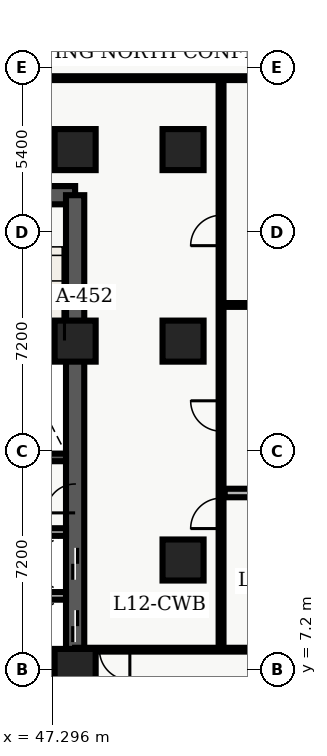
"""IFC4 building model, lengths in metres.
Left out: names, types, materials, properties, quantities, classifications, styles, units other than length and angle.
Written with IfcOpenShell. Run it as: python <this file> out.ifc"""

import sys

from ifc_helpers import new_model, entity, si_unit, converted_unit, direction, frame, origin_with_axes, origin_2d_with_axis, place, context, subcontext, project, spatial, polyline, rectangle, outline, extrude, element, fill, save


model = new_model("IFC4")
c1 = context("Model", 3, precision=1e-05, world=origin_with_axes(), true_north=direction((0.0, 1.0)))
c2 = subcontext(c1, "Body", "Model", "MODEL_VIEW")
j1 = project(units=[si_unit("LENGTHUNIT", "METRE"), converted_unit("PLANEANGLEUNIT", "DEGREE", entity("IfcPlaneAngleMeasure", 0.017), si_unit("PLANEANGLEUNIT", "RADIAN"), dimensions=[0, 0, 0, 0, 0, 0, 0])], contexts=[c1])
p1 = place(None, origin_with_axes())
s1 = spatial("IfcSite", under=j1, at=p1, CompositionType="ELEMENT")
p2 = place(p1, origin_with_axes())
s2 = spatial("IfcBuilding", under=s1, at=p2, CompositionType="ELEMENT")
p3 = place(p2, frame((0.0, 0.0, 52.2), z_axis=(0.0, 0.0, 1.0), x_axis=(1.0, 0.0, 0.0)))
s3 = spatial("IfcBuildingStorey", under=s2, at=p3, CompositionType="ELEMENT", Elevation=52.2)
p4 = place(p3, frame((40.2, 7.2, 0.0), z_axis=(0.0, 0.0, 1.0), x_axis=(1.0, 0.0, 0.0)))
e1 = element("IfcWall", 1, at=p4, inside=s3, PredefinedType="SHEAR", context=c2, shape_type="SweptSolid", body=[
    extrude(outline(polyline([(0.0, -0.3), (7.85, -0.3), (7.85, 0.3), (0.0, 0.3), (0.0, -0.3)])), origin_with_axes(), (0.0, 0.0, 1.0), 3.66),
])
p5 = place(p4, frame((2.175, 0.0, 0.0), z_axis=(0.0, 0.0, 1.0), x_axis=(1.0, 0.0, 0.0)))
e2 = element("IfcOpeningElement", 2, at=p5, cuts=e1, PredefinedType="OPENING", context=c2, shape_type="SweptSolid", body=[
    extrude(rectangle(XDim=1.05, YDim=0.62, at=origin_2d_with_axis()), origin_with_axes(), (0.0, 0.0, 1.0), 2.15),
])
p6 = place(p3, frame((40.2, 22.8, 0.0), z_axis=(0.0, 0.0, 1.0), x_axis=(1.0, 0.0, 0.0)))
e3 = element("IfcWall", 3, at=p6, inside=s3, PredefinedType="SHEAR", context=c2, shape_type="SweptSolid", body=[
    extrude(outline(polyline([(0.0, -0.3), (7.85, -0.3), (7.85, 0.3), (0.0, 0.3), (0.0, -0.3)])), origin_with_axes(), (0.0, 0.0, 1.0), 3.66),
])
p7 = place(p6, frame((5.775, 0.0, 0.0), z_axis=(0.0, 0.0, 1.0), x_axis=(1.0, 0.0, 0.0)))
e4 = element("IfcOpeningElement", 4, at=p7, cuts=e3, PredefinedType="OPENING", context=c2, shape_type="SweptSolid", body=[
    extrude(rectangle(XDim=1.05, YDim=0.62, at=origin_2d_with_axis()), origin_with_axes(), (0.0, 0.0, 1.0), 2.15),
])
p8 = place(p6, frame((2.15, 0.0, 0.0), z_axis=(0.0, 0.0, 1.0), x_axis=(1.0, 0.0, 0.0)))
e5 = element("IfcOpeningElement", 5, at=p8, cuts=e3, PredefinedType="OPENING", context=c2, shape_type="SweptSolid", body=[
    extrude(rectangle(XDim=0.9, YDim=0.62, at=origin_2d_with_axis()), origin_with_axes(), (0.0, 0.0, 1.0), 2.15),
])
p9 = place(p3, frame((48.05, 7.2, 0.0), z_axis=(0.0, 0.0, 1.0), x_axis=(0.0, 1.0, 0.0)))
e6 = element("IfcWall", 6, at=p9, inside=s3, PredefinedType="SHEAR", context=c2, shape_type="SweptSolid", body=[
    extrude(outline(polyline([(0.0, -0.3), (15.6, -0.3), (15.6, 0.3), (0.0, 0.3), (0.0, -0.3)])), origin_with_axes(), (0.0, 0.0, 1.0), 3.66),
])
p10 = place(p9, frame((1.425, 0.0, 0.0), z_axis=(0.0, 0.0, 1.0), x_axis=(1.0, 0.0, 0.0)))
e7 = element("IfcOpeningElement", 7, at=p10, cuts=e6, PredefinedType="OPENING", context=c2, shape_type="SweptSolid", body=[
    extrude(rectangle(XDim=1.05, YDim=0.62, at=origin_2d_with_axis()), origin_with_axes(), (0.0, 0.0, 1.0), 2.15),
])
p11 = place(p9, frame((3.475, 0.0, 0.0), z_axis=(0.0, 0.0, 1.0), x_axis=(1.0, 0.0, 0.0)))
e8 = element("IfcOpeningElement", 8, at=p11, cuts=e6, PredefinedType="OPENING", context=c2, shape_type="SweptSolid", body=[
    extrude(rectangle(XDim=1.05, YDim=0.62, at=origin_2d_with_axis()), origin_with_axes(), (0.0, 0.0, 1.0), 2.15),
])
p12 = place(p9, frame((5.625, 0.0, 0.0), z_axis=(0.0, 0.0, 1.0), x_axis=(1.0, 0.0, 0.0)))
e9 = element("IfcOpeningElement", 9, at=p12, cuts=e6, PredefinedType="OPENING", context=c2, shape_type="SweptSolid", body=[
    extrude(rectangle(XDim=0.95, YDim=0.62, at=origin_2d_with_axis()), origin_with_axes(), (0.0, 0.0, 1.0), 2.15),
])
p13 = place(p3, frame((44.25, 14.175, 0.0), z_axis=(0.0, 0.0, 1.0), x_axis=(1.0, 0.0, 0.0)))
e10 = element("IfcWall", 10, at=p13, inside=s3, PredefinedType="SHEAR", context=c2, shape_type="SweptSolid", body=[
    extrude(outline(polyline([(0.0, -0.125), (3.5, -0.125), (3.5, 0.125), (0.0, 0.125), (0.0, -0.125)])), origin_with_axes(), (0.0, 0.0, 1.0), 3.66),
])
for number, where, z_axis, x_axis in (
    (11, (48.05, 7.2, 0.0), (0.0, 0.0, 1.0), (1.0, 0.0, 0.0)),
    (12, (48.05, 18.0, 0.0), (0.0, 0.0, 1.0), (1.0, 0.0, 0.0)),
    (13, (48.05, 24.3, 0.0), (0.0, 0.0, 1.0), (1.0, 0.0, 0.0)),
    (14, (51.6, 10.8, 0.0), (0.0, 0.0, 1.0), (1.0, 0.0, 0.0)),
    (15, (51.6, 18.0, 0.0), (0.0, 0.0, 1.0), (1.0, 0.0, 0.0)),
    (16, (51.6, 24.3, 0.0), (0.0, 0.0, 1.0), (1.0, 0.0, 0.0)),
):
    element("IfcColumn", number, at=place(p3, frame(where, z_axis=z_axis, x_axis=x_axis)), inside=s3, PredefinedType="COLUMN", context=c2, shape_type="SweptSolid", body=[
        extrude(rectangle(XDim=1.35, YDim=1.35, at=origin_2d_with_axis()), origin_with_axes(), (0.0, 0.0, 1.0), 3.9),
    ])
for number, where, z_axis, x_axis in (
    (17, (44.25, 9.62, 0.0), (0.0, 0.0, 1.0), (1.0, 0.0, 0.0)),
    (18, (44.25, 11.72, 0.0), (0.0, 0.0, 1.0), (1.0, 0.0, 0.0)),
):
    element("IfcWall", number, at=place(p3, frame(where, z_axis=z_axis, x_axis=x_axis)), inside=s3, PredefinedType="SOLIDWALL", context=c2, shape_type="SweptSolid", body=[
        extrude(outline(polyline([(0.0, -0.125), (3.5, -0.125), (3.5, 0.125), (0.0, 0.125), (0.0, -0.125)])), origin_with_axes(), (0.0, 0.0, 1.0), 2.7),
    ])
p14 = place(p3, frame((52.85, 7.85, 0.0), z_axis=(0.0, 0.0, 1.0), x_axis=(0.0, 1.0, 0.0)))
e19 = element("IfcWall", 19, at=p14, inside=s3, PredefinedType="PARTITIONING", context=c2, shape_type="SweptSolid", body=[
    extrude(outline(polyline([(0.0, -0.08), (18.8, -0.08), (18.8, 0.08), (0.0, 0.08), (0.0, -0.08)])), origin_with_axes(), (0.0, 0.0, 1.0), 2.7),
])
p15 = place(p14, frame((4.484, 0.0, 0.0), z_axis=(0.0, 0.0, 1.0), x_axis=(1.0, 0.0, 0.0)))
e20 = element("IfcOpeningElement", 20, at=p15, cuts=e19, PredefinedType="OPENING", context=c2, shape_type="SweptSolid", body=[
    extrude(rectangle(XDim=1.0, YDim=0.18, at=origin_2d_with_axis()), origin_with_axes(), (0.0, 0.0, 1.0), 2.15),
])
p16 = place(p14, frame((7.687, 0.0, 0.0), z_axis=(0.0, 0.0, 1.0), x_axis=(1.0, 0.0, 0.0)))
e21 = element("IfcOpeningElement", 21, at=p16, cuts=e19, PredefinedType="OPENING", context=c2, shape_type="SweptSolid", body=[
    extrude(rectangle(XDim=1.0, YDim=0.18, at=origin_2d_with_axis()), origin_with_axes(), (0.0, 0.0, 1.0), 2.15),
])
p17 = place(p14, frame((13.79, 0.0, 0.0), z_axis=(0.0, 0.0, 1.0), x_axis=(1.0, 0.0, 0.0)))
e22 = element("IfcOpeningElement", 22, at=p17, cuts=e19, PredefinedType="OPENING", context=c2, shape_type="SweptSolid", body=[
    extrude(rectangle(XDim=1.0, YDim=0.18, at=origin_2d_with_axis()), origin_with_axes(), (0.0, 0.0, 1.0), 2.15),
])
p18 = place(p3, frame((59.64, 7.85, 0.0), z_axis=(0.0, 0.0, 1.0), x_axis=(-1.0, 0.0, 0.0)))
e23 = element("IfcWall", 23, at=p18, inside=s3, PredefinedType="PARTITIONING", context=c2, shape_type="SweptSolid", body=[
    extrude(outline(polyline([(0.0, -0.062), (11.59, -0.062), (11.59, 0.062), (0.0, 0.062), (0.0, -0.062)])), origin_with_axes(), (0.0, 0.0, 1.0), 2.7),
])
p19 = place(p18, frame((10.29, 0.0, 0.0), z_axis=(0.0, 0.0, 1.0), x_axis=(1.0, 0.0, 0.0)))
e24 = element("IfcOpeningElement", 24, at=p19, cuts=e23, PredefinedType="OPENING", context=c2, shape_type="SweptSolid", body=[
    extrude(rectangle(XDim=1.0, YDim=0.145, at=origin_2d_with_axis()), origin_with_axes(), (0.0, 0.0, 1.0), 2.15),
])
p20 = place(p3, frame((38.76, 26.65, 0.0), z_axis=(0.0, 0.0, 1.0), x_axis=(1.0, 0.0, 0.0)))
e25 = element("IfcWall", 25, at=p20, inside=s3, PredefinedType="PARTITIONING", context=c2, shape_type="SweptSolid", body=[
    extrude(outline(polyline([(0.0, -0.062), (20.88, -0.062), (20.88, 0.062), (0.0, 0.062), (0.0, -0.062)])), origin_with_axes(), (0.0, 0.0, 1.0), 2.7),
])
p21 = place(p20, frame((4.24, 0.0, 0.0), z_axis=(0.0, 0.0, 1.0), x_axis=(1.0, 0.0, 0.0)))
e26 = element("IfcOpeningElement", 26, at=p21, cuts=e25, PredefinedType="OPENING", context=c2, shape_type="SweptSolid", body=[
    extrude(rectangle(XDim=1.0, YDim=0.145, at=origin_2d_with_axis()), origin_with_axes(), (0.0, 0.0, 1.0), 2.15),
])
p22 = place(p3, frame((52.97, 13.004, 0.0), z_axis=(0.0, 0.0, 1.0), x_axis=(1.0, 0.0, 0.0)))
e27 = element("IfcWall", 27, at=p22, inside=s3, PredefinedType="PARTITIONING", context=c2, shape_type="SweptSolid", body=[
    extrude(outline(polyline([(0.0, -0.14), (6.655, -0.14), (6.655, 0.14), (0.0, 0.14), (0.0, -0.14)])), origin_with_axes(), (0.0, 0.0, 1.0), 2.7),
])
p23 = place(p3, frame((52.97, 19.189, 0.0), z_axis=(0.0, 0.0, 1.0), x_axis=(1.0, 0.0, 0.0)))
e28 = element("IfcWall", 28, at=p23, inside=s3, PredefinedType="PARTITIONING", context=c2, shape_type="SweptSolid", body=[
    extrude(outline(polyline([(0.0, -0.062), (6.655, -0.062), (6.655, 0.062), (0.0, 0.062), (0.0, -0.062)])), origin_with_axes(), (0.0, 0.0, 1.0), 2.7),
])
p24 = place(p9, frame((1.425, 0.0, 0.0), z_axis=(0.0, 0.0, 1.0), x_axis=(1.0, 0.0, 0.0)))
e29 = element("IfcDoor", 29, at=p24, inside=s3, OperationType="SLIDING_TO_LEFT", PredefinedType="DOOR", context=c2, shape_type="SweptSolid", body=[
    extrude(rectangle(XDim=1.05, YDim=0.09, at=origin_2d_with_axis()), origin_with_axes(), (0.0, 0.0, 1.0), 2.15),
])
fill(e7, e29)
p25 = place(p9, frame((3.475, 0.0, 0.0), z_axis=(0.0, 0.0, 1.0), x_axis=(1.0, 0.0, 0.0)))
e30 = element("IfcDoor", 30, at=p25, inside=s3, OperationType="SLIDING_TO_RIGHT", PredefinedType="DOOR", context=c2, shape_type="SweptSolid", body=[
    extrude(rectangle(XDim=1.05, YDim=0.09, at=origin_2d_with_axis()), origin_with_axes(), (0.0, 0.0, 1.0), 2.15),
])
fill(e8, e30)
p26 = place(p9, frame((5.625, 0.0, 0.0), z_axis=(0.0, 0.0, 1.0), x_axis=(1.0, 0.0, 0.0)))
e31 = element("IfcDoor", 31, at=p26, inside=s3, OperationType="SINGLE_SWING_LEFT", PredefinedType="DOOR", context=c2, shape_type="SweptSolid", body=[
    extrude(rectangle(XDim=0.95, YDim=0.09, at=origin_2d_with_axis()), origin_with_axes(), (0.0, 0.0, 1.0), 2.15),
])
fill(e9, e31)
p27 = place(p18, frame((10.29, 0.0, 0.0), z_axis=(0.0, 0.0, 1.0), x_axis=(1.0, 0.0, 0.0)))
e32 = element("IfcDoor", 32, at=p27, inside=s3, OperationType="SINGLE_SWING_LEFT", PredefinedType="DOOR", context=c2, shape_type="SweptSolid", body=[
    extrude(rectangle(XDim=1.0, YDim=0.075, at=origin_2d_with_axis()), origin_with_axes(), (0.0, 0.0, 1.0), 2.15),
])
fill(e24, e32)
p28 = place(p14, frame((4.484, 0.0, 0.0), z_axis=(0.0, 0.0, 1.0), x_axis=(1.0, 0.0, 0.0)))
e33 = element("IfcDoor", 33, at=p28, inside=s3, OperationType="SINGLE_SWING_LEFT", PredefinedType="DOOR", context=c2, shape_type="SweptSolid", body=[
    extrude(rectangle(XDim=1.0, YDim=0.09, at=origin_2d_with_axis()), origin_with_axes(), (0.0, 0.0, 1.0), 2.15),
])
fill(e20, e33)
p29 = place(p14, frame((7.687, 0.0, 0.0), z_axis=(0.0, 0.0, 1.0), x_axis=(1.0, 0.0, 0.0)))
e34 = element("IfcDoor", 34, at=p29, inside=s3, OperationType="SINGLE_SWING_RIGHT", PredefinedType="DOOR", context=c2, shape_type="SweptSolid", body=[
    extrude(rectangle(XDim=1.0, YDim=0.09, at=origin_2d_with_axis()), origin_with_axes(), (0.0, 0.0, 1.0), 2.15),
])
fill(e21, e34)
p30 = place(p14, frame((13.79, 0.0, 0.0), z_axis=(0.0, 0.0, 1.0), x_axis=(1.0, 0.0, 0.0)))
e35 = element("IfcDoor", 35, at=p30, inside=s3, OperationType="SINGLE_SWING_LEFT", PredefinedType="DOOR", context=c2, shape_type="SweptSolid", body=[
    extrude(rectangle(XDim=1.0, YDim=0.09, at=origin_2d_with_axis()), origin_with_axes(), (0.0, 0.0, 1.0), 2.15),
])
fill(e22, e35)
save(model, sys.argv[1])
